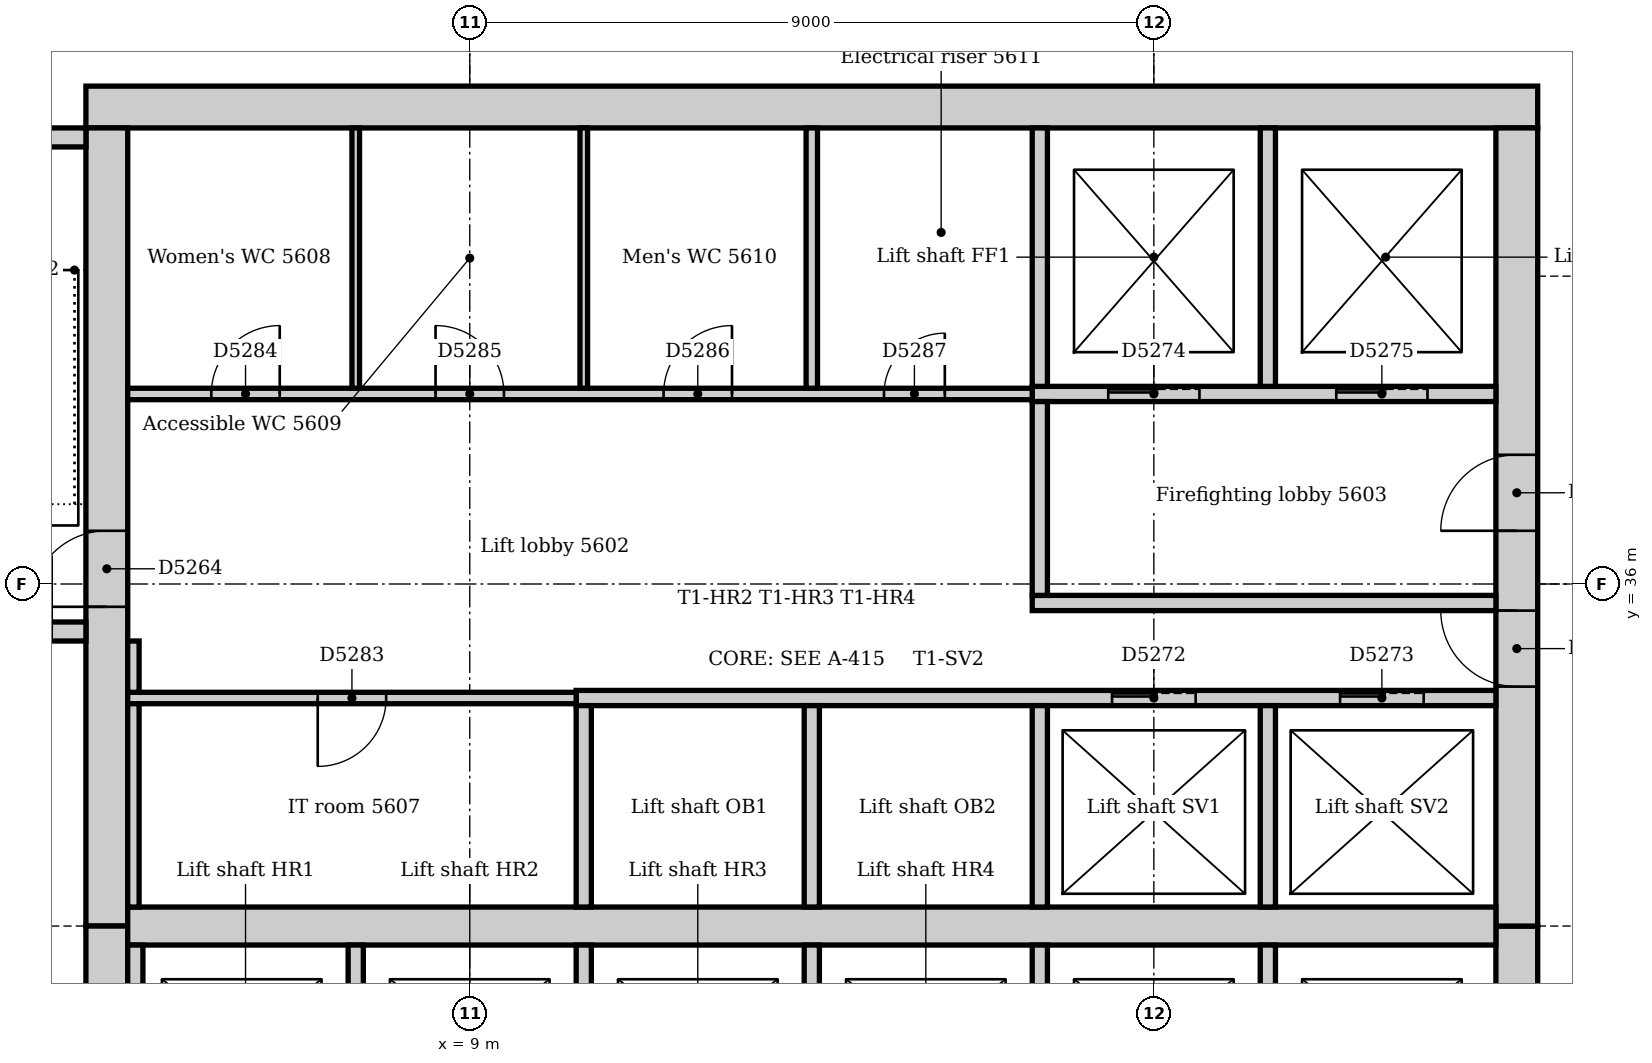
"""IFC4 building model, lengths in metres.
Left out: names, types, materials, properties, quantities, classifications, styles, units other than length and angle.
Written with IfcOpenShell. Run it as: python <this file> out.ifc"""

import sys

from ifc_helpers import new_model, si_unit, direction, frame, frame_2d, origin, place, context, subcontext, project, spatial, rectangle, extrude, element, fill, save


model = new_model("IFC4")
c1 = context("Model", 3, precision=1e-05, world=origin(), true_north=direction((0.0, 1.0)))
c2 = subcontext(c1, "Body", "Model", "MODEL_VIEW")
j1 = project(units=[si_unit("LENGTHUNIT", "METRE"), si_unit("PLANEANGLEUNIT", "RADIAN")], contexts=[c1])
p1 = place(None, origin())
s1 = spatial("IfcSite", under=j1, at=p1, CompositionType="ELEMENT")
p2 = place(p1, origin())
s2 = spatial("IfcBuilding", under=s1, at=p2, CompositionType="ELEMENT")
p3 = place(p2, frame((0.0, 0.0, 234.0)))
s3 = spatial("IfcBuildingStorey", under=s2, at=p3, CompositionType="ELEMENT", Elevation=234.0)
p4 = place(p3, frame((23.05, 42.275, 0.0), z_axis=(0.0, 0.0, 1.0), x_axis=(-1.0, 0.0, 0.0)))
e1 = element("IfcWall", 1, at=p4, inside=s3, PredefinedType="SOLIDWALL", context=c2, shape_type="SweptSolid", body=[
    extrude(rectangle(XDim=19.1, YDim=0.55, at=frame_2d((9.55, 0.0))), origin(), (0.0, 0.0, 1.0), 4.0),
])
p5 = place(p3, frame((22.775, 21.0, 0.0), z_axis=(0.0, 0.0, 1.0), x_axis=(0.0, 1.0, 0.0)))
e2 = element("IfcWall", 2, at=p5, inside=s3, PredefinedType="SOLIDWALL", context=c2, shape_type="SweptSolid", body=[
    extrude(rectangle(XDim=10.5, YDim=0.55, at=frame_2d((5.25, 0.0))), origin(), (0.0, 0.0, 1.0), 4.0),
])
p6 = place(p5, frame((4.35, 0.0, 0.0)))
e3 = element("IfcOpeningElement", 3, at=p6, cuts=e2, PredefinedType="OPENING", context=c2, shape_type="SweptSolid", body=[
    extrude(rectangle(XDim=1.8, YDim=2.1, at=frame_2d((0.9, 1.05))), frame((0.0, 0.285, 0.0), z_axis=(0.0, -1.0, 0.0), x_axis=(1.0, 0.0, 0.0)), (0.0, 0.0, 1.0), 0.57),
])
p7 = place(p3, frame((22.775, 31.5, 0.0), z_axis=(0.0, 0.0, 1.0), x_axis=(0.0, 1.0, 0.0)))
e4 = element("IfcWall", 4, at=p7, inside=s3, PredefinedType="SOLIDWALL", context=c2, shape_type="SweptSolid", body=[
    extrude(rectangle(XDim=10.5, YDim=0.55, at=frame_2d((5.25, 0.0))), origin(), (0.0, 0.0, 1.0), 4.0),
])
p8 = place(p7, frame((3.15, 0.0, 0.0)))
e5 = element("IfcOpeningElement", 5, at=p8, cuts=e4, PredefinedType="OPENING", context=c2, shape_type="SweptSolid", body=[
    extrude(rectangle(XDim=1.0, YDim=2.1, at=frame_2d((0.5, 1.05))), frame((0.0, 0.285, 0.0), z_axis=(0.0, -1.0, 0.0), x_axis=(1.0, 0.0, 0.0)), (0.0, 0.0, 1.0), 0.57),
])
p9 = place(p7, frame((5.2, 0.0, 0.0)))
e6 = element("IfcOpeningElement", 6, at=p9, cuts=e4, PredefinedType="OPENING", context=c2, shape_type="SweptSolid", body=[
    extrude(rectangle(XDim=1.0, YDim=2.1, at=frame_2d((0.5, 1.05))), frame((0.0, 0.285, 0.0), z_axis=(0.0, -1.0, 0.0), x_axis=(1.0, 0.0, 0.0)), (0.0, 0.0, 1.0), 0.57),
])
p10 = place(p3, frame((4.225, 42.0, 0.0), z_axis=(0.0, 0.0, 1.0), x_axis=(0.0, -1.0, 0.0)))
e7 = element("IfcWall", 7, at=p10, inside=s3, PredefinedType="SOLIDWALL", context=c2, shape_type="SweptSolid", body=[
    extrude(rectangle(XDim=10.5, YDim=0.55, at=frame_2d((5.25, 0.0))), origin(), (0.0, 0.0, 1.0), 4.0),
])
p11 = place(p10, frame((5.3, 0.0, 0.0)))
e8 = element("IfcOpeningElement", 8, at=p11, cuts=e7, PredefinedType="OPENING", context=c2, shape_type="SweptSolid", body=[
    extrude(rectangle(XDim=1.0, YDim=2.1, at=frame_2d((0.5, 1.05))), frame((0.0, 0.285, 0.0), z_axis=(0.0, -1.0, 0.0), x_axis=(1.0, 0.0, 0.0)), (0.0, 0.0, 1.0), 0.57),
])
p12 = place(p3, frame((4.225, 31.5, 0.0), z_axis=(0.0, 0.0, 1.0), x_axis=(0.0, -1.0, 0.0)))
e9 = element("IfcWall", 9, at=p12, inside=s3, PredefinedType="SOLIDWALL", context=c2, shape_type="SweptSolid", body=[
    extrude(rectangle(XDim=10.5, YDim=0.55, at=frame_2d((5.25, 0.0))), origin(), (0.0, 0.0, 1.0), 4.0),
])
p13 = place(p12, frame((4.25, 0.0, 0.0)))
e10 = element("IfcOpeningElement", 10, at=p13, cuts=e9, PredefinedType="OPENING", context=c2, shape_type="SweptSolid", body=[
    extrude(rectangle(XDim=1.0, YDim=2.1, at=frame_2d((0.5, 1.05))), frame((0.0, 0.285, 0.0), z_axis=(0.0, -1.0, 0.0), x_axis=(1.0, 0.0, 0.0)), (0.0, 0.0, 1.0), 0.57),
])
p14 = place(p3, frame((4.5, 31.5, 0.0), z_axis=(0.0, 0.0, 1.0), x_axis=(1.0, 0.0, 0.0)))
e11 = element("IfcWall", 11, at=p14, inside=s3, PredefinedType="SOLIDWALL", context=c2, shape_type="SweptSolid", body=[
    extrude(rectangle(XDim=18.0, YDim=0.5, at=frame_2d((9.0, 0.0))), origin(), (0.0, 0.0, 1.0), 4.0),
])
p15 = place(p3, frame((0.36, 35.375, 0.0), z_axis=(0.0, 0.0, 1.0), x_axis=(1.0, 0.0, 0.0)))
e12 = element("IfcWall", 12, at=p15, inside=s3, PredefinedType="SOLIDWALL", context=c2, shape_type="SweptSolid", body=[
    extrude(rectangle(XDim=3.59, YDim=0.25, at=frame_2d((1.795, 0.0))), origin(), (0.0, 0.0, 1.0), 4.0),
])
p16 = place(p15, frame((2.14, 0.0, 0.0)))
e13 = element("IfcOpeningElement", 13, at=p16, cuts=e12, PredefinedType="OPENING", context=c2, shape_type="SweptSolid", body=[
    extrude(rectangle(XDim=1.0, YDim=2.1, at=frame_2d((0.5, 1.05))), frame((0.0, 0.135, 0.0), z_axis=(0.0, -1.0, 0.0), x_axis=(1.0, 0.0, 0.0)), (0.0, 0.0, 1.0), 0.27),
])
p17 = place(p3, frame((3.95, 41.875, 0.0), z_axis=(0.0, 0.0, 1.0), x_axis=(-1.0, 0.0, 0.0)))
e14 = element("IfcWall", 14, at=p17, inside=s3, PredefinedType="SOLIDWALL", context=c2, shape_type="SweptSolid", body=[
    extrude(rectangle(XDim=3.59, YDim=0.25, at=frame_2d((1.795, 0.0))), origin(), (0.0, 0.0, 1.0), 4.0),
])
p18 = place(p3, frame((16.4, 35.75, 0.0), z_axis=(0.0, 0.0, 1.0), x_axis=(1.0, 0.0, 0.0)))
e15 = element("IfcWall", 15, at=p18, inside=s3, PredefinedType="PARTITIONING", context=c2, shape_type="SweptSolid", body=[
    extrude(rectangle(XDim=6.1, YDim=0.2, at=frame_2d((3.05, 0.0))), origin(), (0.0, 0.0, 1.0), 3.85),
])
p19 = place(p3, frame((16.4, 38.5, 0.0), z_axis=(0.0, 0.0, 1.0), x_axis=(1.0, 0.0, 0.0)))
e16 = element("IfcWall", 16, at=p19, inside=s3, PredefinedType="PARTITIONING", context=c2, shape_type="SweptSolid", body=[
    extrude(rectangle(XDim=6.1, YDim=0.2, at=frame_2d((3.05, 0.0))), origin(), (0.0, 0.0, 1.0), 3.85),
])
p20 = place(p19, frame((1.0, 0.0, 0.0)))
e17 = element("IfcOpeningElement", 17, at=p20, cuts=e16, PredefinedType="OPENING", context=c2, shape_type="SweptSolid", body=[
    extrude(rectangle(XDim=1.2, YDim=2.1, at=frame_2d((0.6, 1.05))), frame((0.0, 0.11, 0.0), z_axis=(0.0, -1.0, 0.0), x_axis=(1.0, 0.0, 0.0)), (0.0, 0.0, 1.0), 0.22),
])
p21 = place(p19, frame((4.0, 0.0, 0.0)))
e18 = element("IfcOpeningElement", 18, at=p21, cuts=e16, PredefinedType="OPENING", context=c2, shape_type="SweptSolid", body=[
    extrude(rectangle(XDim=1.2, YDim=2.1, at=frame_2d((0.6, 1.05))), frame((0.0, 0.11, 0.0), z_axis=(0.0, -1.0, 0.0), x_axis=(1.0, 0.0, 0.0)), (0.0, 0.0, 1.0), 0.22),
])
p22 = place(p3, frame((16.5, 35.85, 0.0), z_axis=(0.0, 0.0, 1.0), x_axis=(0.0, 1.0, 0.0)))
e19 = element("IfcWall", 19, at=p22, inside=s3, PredefinedType="PARTITIONING", context=c2, shape_type="SweptSolid", body=[
    extrude(rectangle(XDim=2.55, YDim=0.2, at=frame_2d((1.275, 0.0))), origin(), (0.0, 0.0, 1.0), 3.85),
])
p23 = place(p3, frame((10.4, 34.5, 0.0), z_axis=(0.0, 0.0, 1.0), x_axis=(1.0, 0.0, 0.0)))
e20 = element("IfcWall", 20, at=p23, inside=s3, PredefinedType="PARTITIONING", context=c2, shape_type="SweptSolid", body=[
    extrude(rectangle(XDim=12.1, YDim=0.2, at=frame_2d((6.05, 0.0))), origin(), (0.0, 0.0, 1.0), 3.85),
])
p24 = place(p23, frame((7.05, 0.0, 0.0)))
e21 = element("IfcOpeningElement", 21, at=p24, cuts=e20, PredefinedType="OPENING", context=c2, shape_type="SweptSolid", body=[
    extrude(rectangle(XDim=1.1, YDim=2.1, at=frame_2d((0.55, 1.05))), frame((0.0, 0.11, 0.0), z_axis=(0.0, -1.0, 0.0), x_axis=(1.0, 0.0, 0.0)), (0.0, 0.0, 1.0), 0.22),
])
p25 = place(p23, frame((10.05, 0.0, 0.0)))
e22 = element("IfcOpeningElement", 22, at=p25, cuts=e20, PredefinedType="OPENING", context=c2, shape_type="SweptSolid", body=[
    extrude(rectangle(XDim=1.1, YDim=2.1, at=frame_2d((0.55, 1.05))), frame((0.0, 0.11, 0.0), z_axis=(0.0, -1.0, 0.0), x_axis=(1.0, 0.0, 0.0)), (0.0, 0.0, 1.0), 0.22),
])
for number, where, z_axis, x_axis in (
    (23, (10.5, 28.6, 0.0), (0.0, 0.0, 1.0), (0.0, 1.0, 0.0)),
    (24, (10.5, 31.75, 0.0), (0.0, 0.0, 1.0), (0.0, 1.0, 0.0)),
    (25, (13.5, 28.6, 0.0), (0.0, 0.0, 1.0), (0.0, 1.0, 0.0)),
    (26, (13.5, 31.75, 0.0), (0.0, 0.0, 1.0), (0.0, 1.0, 0.0)),
    (27, (16.5, 28.6, 0.0), (0.0, 0.0, 1.0), (0.0, 1.0, 0.0)),
    (28, (16.5, 31.75, 0.0), (0.0, 0.0, 1.0), (0.0, 1.0, 0.0)),
    (29, (19.5, 28.6, 0.0), (0.0, 0.0, 1.0), (0.0, 1.0, 0.0)),
    (30, (19.5, 31.75, 0.0), (0.0, 0.0, 1.0), (0.0, 1.0, 0.0)),
):
    element("IfcWall", number, at=place(p3, frame(where, z_axis=z_axis, x_axis=x_axis)), inside=s3, PredefinedType="PARTITIONING", context=c2, shape_type="SweptSolid", body=[
        extrude(rectangle(XDim=2.65, YDim=0.2, at=frame_2d((1.325, 0.0))), origin(), (0.0, 0.0, 1.0), 3.85),
    ])
for number, where, z_axis, x_axis in (
    (31, (16.5, 38.6, 0.0), (0.0, 0.0, 1.0), (0.0, 1.0, 0.0)),
    (32, (19.5, 38.6, 0.0), (0.0, 0.0, 1.0), (0.0, 1.0, 0.0)),
):
    element("IfcWall", number, at=place(p3, frame(where, z_axis=z_axis, x_axis=x_axis)), inside=s3, PredefinedType="PARTITIONING", context=c2, shape_type="SweptSolid", body=[
        extrude(rectangle(XDim=3.4, YDim=0.2, at=frame_2d((1.7, 0.0))), origin(), (0.0, 0.0, 1.0), 3.85),
    ])
for number, where, z_axis, x_axis in (
    (33, (4.6, 28.6, 0.0), (0.0, 0.0, 1.0), (0.0, 1.0, 0.0)),
    (34, (7.5, 28.6, 0.0), (0.0, 0.0, 1.0), (0.0, 1.0, 0.0)),
):
    element("IfcWall", number, at=place(p3, frame(where, z_axis=z_axis, x_axis=x_axis)), inside=s3, PredefinedType="PARTITIONING", context=c2, shape_type="SweptSolid", body=[
        extrude(rectangle(XDim=2.65, YDim=0.2, at=frame_2d((1.325, 0.0))), origin(), (0.0, 0.0, 1.0), 3.85),
    ])
p26 = place(p3, frame((4.5, 38.5, 0.0), z_axis=(0.0, 0.0, 1.0), x_axis=(1.0, 0.0, 0.0)))
e35 = element("IfcWall", 35, at=p26, inside=s3, PredefinedType="PARTITIONING", context=c2, shape_type="SweptSolid", body=[
    extrude(rectangle(XDim=11.9, YDim=0.15, at=frame_2d((5.95, 0.0))), origin(), (0.0, 0.0, 1.0), 3.85),
])
p27 = place(p26, frame((1.1, 0.0, 0.0)))
e36 = element("IfcOpeningElement", 36, at=p27, cuts=e35, PredefinedType="OPENING", context=c2, shape_type="SweptSolid", body=[
    extrude(rectangle(XDim=0.9, YDim=2.1, at=frame_2d((0.45, 1.05))), frame((0.0, 0.085, 0.0), z_axis=(0.0, -1.0, 0.0), x_axis=(1.0, 0.0, 0.0)), (0.0, 0.0, 1.0), 0.17),
])
p28 = place(p26, frame((4.05, 0.0, 0.0)))
e37 = element("IfcOpeningElement", 37, at=p28, cuts=e35, PredefinedType="OPENING", context=c2, shape_type="SweptSolid", body=[
    extrude(rectangle(XDim=0.9, YDim=2.1, at=frame_2d((0.45, 1.05))), frame((0.0, 0.085, 0.0), z_axis=(0.0, -1.0, 0.0), x_axis=(1.0, 0.0, 0.0)), (0.0, 0.0, 1.0), 0.17),
])
p29 = place(p26, frame((7.05, 0.0, 0.0)))
e38 = element("IfcOpeningElement", 38, at=p29, cuts=e35, PredefinedType="OPENING", context=c2, shape_type="SweptSolid", body=[
    extrude(rectangle(XDim=0.9, YDim=2.1, at=frame_2d((0.45, 1.05))), frame((0.0, 0.085, 0.0), z_axis=(0.0, -1.0, 0.0), x_axis=(1.0, 0.0, 0.0)), (0.0, 0.0, 1.0), 0.17),
])
p30 = place(p26, frame((9.95, 0.0, 0.0)))
e39 = element("IfcOpeningElement", 39, at=p30, cuts=e35, PredefinedType="OPENING", context=c2, shape_type="SweptSolid", body=[
    extrude(rectangle(XDim=0.8, YDim=2.1, at=frame_2d((0.4, 1.05))), frame((0.0, 0.085, 0.0), z_axis=(0.0, -1.0, 0.0), x_axis=(1.0, 0.0, 0.0)), (0.0, 0.0, 1.0), 0.17),
])
p31 = place(p3, frame((4.5, 34.5, 0.0), z_axis=(0.0, 0.0, 1.0), x_axis=(1.0, 0.0, 0.0)))
e40 = element("IfcWall", 40, at=p31, inside=s3, PredefinedType="PARTITIONING", context=c2, shape_type="SweptSolid", body=[
    extrude(rectangle(XDim=5.9, YDim=0.15, at=frame_2d((2.95, 0.0))), origin(), (0.0, 0.0, 1.0), 3.85),
])
p32 = place(p31, frame((2.5, 0.0, 0.0)))
e41 = element("IfcOpeningElement", 41, at=p32, cuts=e40, PredefinedType="OPENING", context=c2, shape_type="SweptSolid", body=[
    extrude(rectangle(XDim=0.9, YDim=2.1, at=frame_2d((0.45, 1.05))), frame((0.0, 0.085, 0.0), z_axis=(0.0, -1.0, 0.0), x_axis=(1.0, 0.0, 0.0)), (0.0, 0.0, 1.0), 0.17),
])
p33 = place(p3, frame((4.575, 34.575, 0.0), z_axis=(0.0, 0.0, 1.0), x_axis=(0.0, 1.0, 0.0)))
e42 = element("IfcWall", 42, at=p33, inside=s3, PredefinedType="PARTITIONING", context=c2, shape_type="SweptSolid", body=[
    extrude(rectangle(XDim=0.675, YDim=0.15, at=frame_2d((0.338, 0.0))), origin(), (0.0, 0.0, 1.0), 3.85),
])
p34 = place(p3, frame((4.575, 31.75, 0.0), z_axis=(0.0, 0.0, 1.0), x_axis=(0.0, 1.0, 0.0)))
e43 = element("IfcWall", 43, at=p34, inside=s3, PredefinedType="PARTITIONING", context=c2, shape_type="SweptSolid", body=[
    extrude(rectangle(XDim=2.675, YDim=0.15, at=frame_2d((1.337, 0.0))), origin(), (0.0, 0.0, 1.0), 3.85),
])
p35 = place(p3, frame((13.5, 38.575, 0.0), z_axis=(0.0, 0.0, 1.0), x_axis=(0.0, 1.0, 0.0)))
e44 = element("IfcWall", 44, at=p35, inside=s3, PredefinedType="PARTITIONING", context=c2, shape_type="SweptSolid", body=[
    extrude(rectangle(XDim=3.425, YDim=0.15, at=frame_2d((1.712, 0.0))), origin(), (0.0, 0.0, 1.0), 3.85),
])
for number, where, z_axis, x_axis in (
    (45, (7.5, 38.575, 0.0), (0.0, 0.0, 1.0), (0.0, 1.0, 0.0)),
    (46, (10.5, 38.575, 0.0), (0.0, 0.0, 1.0), (0.0, 1.0, 0.0)),
):
    element("IfcWall", number, at=place(p3, frame(where, z_axis=z_axis, x_axis=x_axis)), inside=s3, PredefinedType="PARTITIONING", context=c2, shape_type="SweptSolid", body=[
        extrude(rectangle(XDim=3.425, YDim=0.1, at=frame_2d((1.712, 0.0))), origin(), (0.0, 0.0, 1.0), 3.85),
    ])
p36 = place(p11, frame((1.0, 0.0, 0.0), z_axis=(0.0, 0.0, 1.0), x_axis=(-1.0, 0.0, 0.0)))
e47 = element("IfcDoor", 47, at=p36, inside=s3, OperationType="SINGLE_SWING_LEFT", PredefinedType="DOOR", context=c2, shape_type="SweptSolid", body=[
    extrude(rectangle(XDim=1.0, YDim=2.1, at=frame_2d((0.5, 1.05))), frame((0.0, 0.025, 0.0), z_axis=(0.0, -1.0, 0.0), x_axis=(1.0, 0.0, 0.0)), (0.0, 0.0, 1.0), 0.05),
])
fill(e8, e47)
p37 = place(p24, origin())
e48 = element("IfcDoor", 48, at=p37, inside=s3, OperationType="SLIDING_TO_LEFT", PredefinedType="DOOR", context=c2, shape_type="SweptSolid", body=[
    extrude(rectangle(XDim=1.1, YDim=2.1, at=frame_2d((0.55, 1.05))), frame((0.0, 0.025, 0.0), z_axis=(0.0, -1.0, 0.0), x_axis=(1.0, 0.0, 0.0)), (0.0, 0.0, 1.0), 0.05),
])
fill(e21, e48)
p38 = place(p25, origin())
e49 = element("IfcDoor", 49, at=p38, inside=s3, OperationType="SLIDING_TO_LEFT", PredefinedType="DOOR", context=c2, shape_type="SweptSolid", body=[
    extrude(rectangle(XDim=1.1, YDim=2.1, at=frame_2d((0.55, 1.05))), frame((0.0, 0.025, 0.0), z_axis=(0.0, -1.0, 0.0), x_axis=(1.0, 0.0, 0.0)), (0.0, 0.0, 1.0), 0.05),
])
fill(e22, e49)
p39 = place(p20, origin())
e50 = element("IfcDoor", 50, at=p39, inside=s3, OperationType="SLIDING_TO_LEFT", PredefinedType="DOOR", context=c2, shape_type="SweptSolid", body=[
    extrude(rectangle(XDim=1.2, YDim=2.1, at=frame_2d((0.6, 1.05))), frame((0.0, 0.025, 0.0), z_axis=(0.0, -1.0, 0.0), x_axis=(1.0, 0.0, 0.0)), (0.0, 0.0, 1.0), 0.05),
])
fill(e17, e50)
p40 = place(p21, origin())
e51 = element("IfcDoor", 51, at=p40, inside=s3, OperationType="SLIDING_TO_LEFT", PredefinedType="DOOR", context=c2, shape_type="SweptSolid", body=[
    extrude(rectangle(XDim=1.2, YDim=2.1, at=frame_2d((0.6, 1.05))), frame((0.0, 0.025, 0.0), z_axis=(0.0, -1.0, 0.0), x_axis=(1.0, 0.0, 0.0)), (0.0, 0.0, 1.0), 0.05),
])
fill(e18, e51)
p41 = place(p8, origin())
e52 = element("IfcDoor", 52, at=p41, inside=s3, OperationType="SINGLE_SWING_RIGHT", PredefinedType="DOOR", context=c2, shape_type="SweptSolid", body=[
    extrude(rectangle(XDim=1.0, YDim=2.1, at=frame_2d((0.5, 1.05))), frame((0.0, 0.025, 0.0), z_axis=(0.0, -1.0, 0.0), x_axis=(1.0, 0.0, 0.0)), (0.0, 0.0, 1.0), 0.05),
])
fill(e5, e52)
p42 = place(p9, origin())
e53 = element("IfcDoor", 53, at=p42, inside=s3, OperationType="SINGLE_SWING_LEFT", PredefinedType="DOOR", context=c2, shape_type="SweptSolid", body=[
    extrude(rectangle(XDim=1.0, YDim=2.1, at=frame_2d((0.5, 1.05))), frame((0.0, 0.025, 0.0), z_axis=(0.0, -1.0, 0.0), x_axis=(1.0, 0.0, 0.0)), (0.0, 0.0, 1.0), 0.05),
])
fill(e6, e53)
p43 = place(p32, frame((0.9, 0.0, 0.0), z_axis=(0.0, 0.0, 1.0), x_axis=(-1.0, 0.0, 0.0)))
e54 = element("IfcDoor", 54, at=p43, inside=s3, OperationType="SINGLE_SWING_RIGHT", PredefinedType="DOOR", context=c2, shape_type="SweptSolid", body=[
    extrude(rectangle(XDim=0.9, YDim=2.1, at=frame_2d((0.45, 1.05))), frame((0.0, 0.025, 0.0), z_axis=(0.0, -1.0, 0.0), x_axis=(1.0, 0.0, 0.0)), (0.0, 0.0, 1.0), 0.05),
])
fill(e41, e54)
p44 = place(p27, origin())
e55 = element("IfcDoor", 55, at=p44, inside=s3, OperationType="SINGLE_SWING_RIGHT", PredefinedType="DOOR", context=c2, shape_type="SweptSolid", body=[
    extrude(rectangle(XDim=0.9, YDim=2.1, at=frame_2d((0.45, 1.05))), frame((0.0, 0.025, 0.0), z_axis=(0.0, -1.0, 0.0), x_axis=(1.0, 0.0, 0.0)), (0.0, 0.0, 1.0), 0.05),
])
fill(e36, e55)
p45 = place(p28, origin())
e56 = element("IfcDoor", 56, at=p45, inside=s3, OperationType="SINGLE_SWING_LEFT", PredefinedType="DOOR", context=c2, shape_type="SweptSolid", body=[
    extrude(rectangle(XDim=0.9, YDim=2.1, at=frame_2d((0.45, 1.05))), frame((0.0, 0.025, 0.0), z_axis=(0.0, -1.0, 0.0), x_axis=(1.0, 0.0, 0.0)), (0.0, 0.0, 1.0), 0.05),
])
fill(e37, e56)
p46 = place(p29, origin())
e57 = element("IfcDoor", 57, at=p46, inside=s3, OperationType="SINGLE_SWING_RIGHT", PredefinedType="DOOR", context=c2, shape_type="SweptSolid", body=[
    extrude(rectangle(XDim=0.9, YDim=2.1, at=frame_2d((0.45, 1.05))), frame((0.0, 0.025, 0.0), z_axis=(0.0, -1.0, 0.0), x_axis=(1.0, 0.0, 0.0)), (0.0, 0.0, 1.0), 0.05),
])
fill(e38, e57)
p47 = place(p30, origin())
e58 = element("IfcDoor", 58, at=p47, inside=s3, OperationType="SINGLE_SWING_RIGHT", PredefinedType="DOOR", context=c2, shape_type="SweptSolid", body=[
    extrude(rectangle(XDim=0.8, YDim=2.1, at=frame_2d((0.4, 1.05))), frame((0.0, 0.025, 0.0), z_axis=(0.0, -1.0, 0.0), x_axis=(1.0, 0.0, 0.0)), (0.0, 0.0, 1.0), 0.05),
])
fill(e39, e58)
save(model, sys.argv[1])
